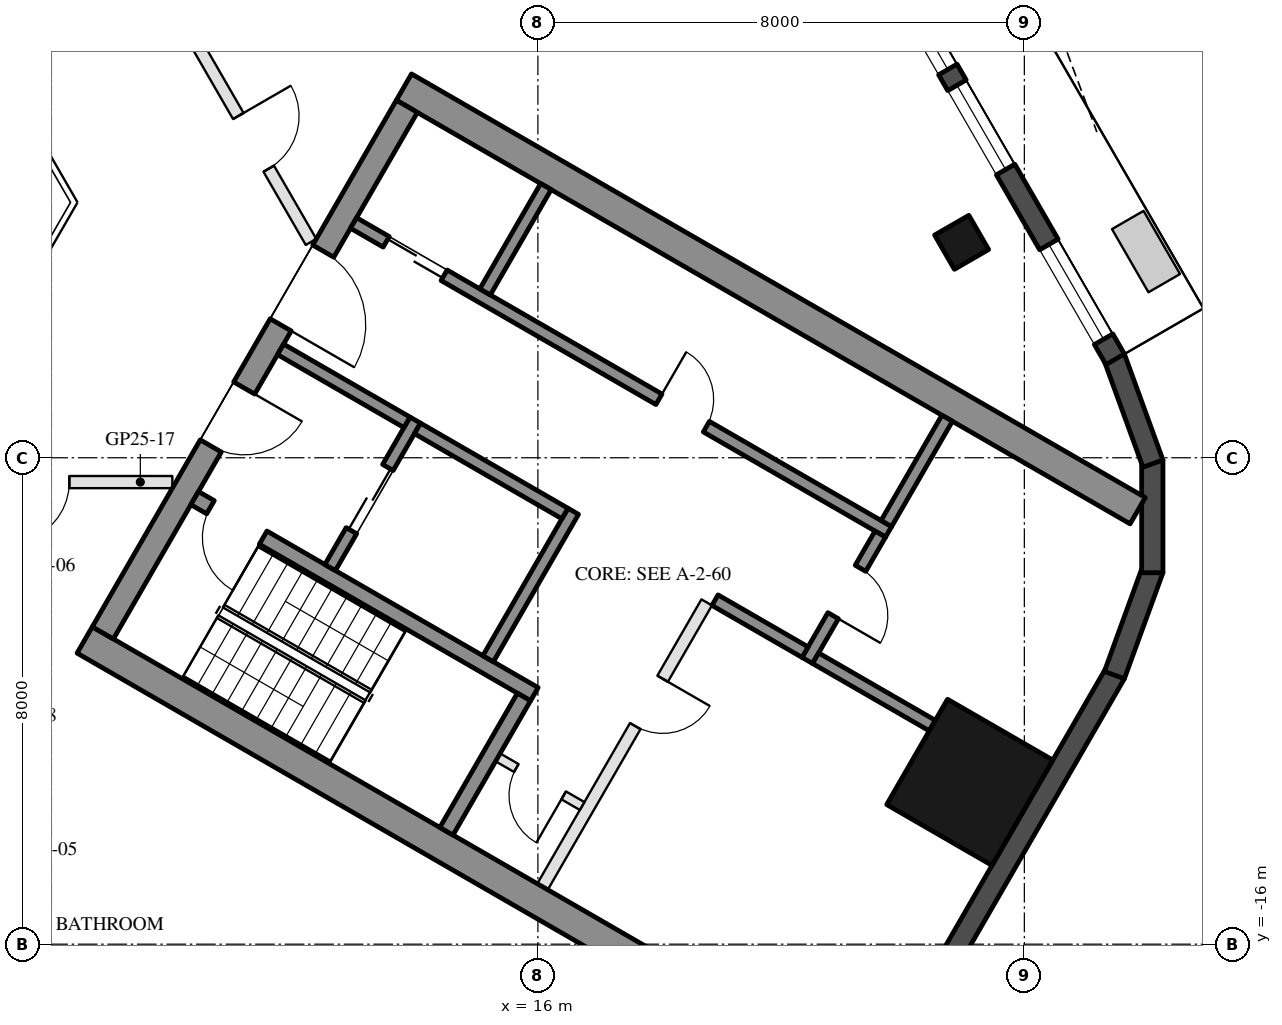
"""IFC4 building model, lengths in metres.
Left out: names, types, materials, properties, quantities, classifications, styles, units other than length and angle.
Written with IfcOpenShell. Run it as: python <this file> out.ifc"""

import sys

from ifc_helpers import new_model, si_unit, direction, frame, frame_2d, origin, origin_2d, place, context, subcontext, project, spatial, rectangle, hollow_rectangle, extrude, boolean, halfspace, element, fill, save


model = new_model("IFC4")
c1 = context("Model", 3, precision=1e-05, world=origin(), true_north=direction((0.0, 1.0)))
c2 = subcontext(c1, "Body", "Model", "MODEL_VIEW")
j1 = project(units=[si_unit("LENGTHUNIT", "METRE"), si_unit("PLANEANGLEUNIT", "RADIAN")], contexts=[c1])
p1 = place(None, origin())
s1 = spatial("IfcSite", under=j1, at=p1, CompositionType="ELEMENT")
p2 = place(p1, origin())
s2 = spatial("IfcBuilding", under=s1, at=p2, CompositionType="ELEMENT")
p3 = place(p2, frame((0.0, 0.0, 257.8)))
s3 = spatial("IfcBuildingStorey", under=s2, at=p3, CompositionType="ELEMENT", Elevation=257.8)
p4 = place(p3, frame((22.968, -4.457, 0.0), z_axis=(0.0, 0.0, 1.0), x_axis=(-0.5, 0.866025403784, 0.0)))
e1 = element("IfcColumn", 1, at=p4, inside=s3, PredefinedType="COLUMN", context=c2, shape_type="SweptSolid", body=[
    boolean("DIFFERENCE", extrude(hollow_rectangle(XDim=0.65, YDim=0.65, WallThickness=0.03, at=origin_2d()), origin(), (0.0, 0.0, 1.0), 3.7), halfspace(frame((0.0, 0.0, 0.047), z_axis=(0.0, 0.0, 1.0), x_axis=(1.0, 0.0, 0.0)), True)),
])
p5 = place(p3, frame((23.102, -13.338, 0.0), z_axis=(0.0, 0.0, 1.0), x_axis=(0.5, 0.866025403784, 0.0)))
e2 = element("IfcColumn", 2, at=p5, inside=s3, PredefinedType="COLUMN", context=c2, shape_type="SweptSolid", body=[
    boolean("DIFFERENCE", extrude(hollow_rectangle(XDim=2.0, YDim=2.0, WallThickness=0.05, at=origin_2d()), origin(), (0.0, 0.0, 1.0), 3.7), halfspace(frame((0.0, 0.0, 0.112), z_axis=(0.0, 0.0, 1.0), x_axis=(1.0, 0.0, 0.0)), True)),
])
p6 = place(p3, frame((22.746, -16.305, 0.0), z_axis=(0.0, 0.0, 1.0), x_axis=(0.500028854569, 0.86600874395, 0.0)))
e3 = element("IfcWall", 3, at=p6, inside=s3, PredefinedType="SOLIDWALL", context=c2, shape_type="SweptSolid", body=[
    extrude(rectangle(XDim=5.495, YDim=0.35, at=frame_2d((2.748, 0.0))), origin(), (0.0, 0.0, 1.0), 3.55),
])
p7 = place(p3, frame((25.481, -11.574, 0.0), z_axis=(0.0, 0.0, 1.0), x_axis=(0.341890986265, 0.93973962006, 0.0)))
e4 = element("IfcWall", 4, at=p7, inside=s3, PredefinedType="SOLIDWALL", context=c2, shape_type="SweptSolid", body=[
    extrude(rectangle(XDim=1.855, YDim=0.35, at=frame_2d((0.928, 0.0))), origin(), (0.0, 0.0, 1.0), 3.55),
])
for number, where, z_axis, x_axis in (
    (5, (26.104, -9.891, 0.0), (0.0, 0.0, 1.0), (0.0, 1.0, 0.0)),
    (6, (26.115, -8.096, 0.0), (0.0, 0.0, 1.0), (-0.342, 0.94, 0.0)),
):
    element("IfcWall", number, at=place(p3, frame(where, z_axis=z_axis, x_axis=x_axis)), inside=s3, PredefinedType="SOLIDWALL", context=c2, shape_type="SweptSolid", body=[
        extrude(rectangle(XDim=1.855, YDim=0.35, at=frame_2d((0.927, 0.0))), origin(), (0.0, 0.0, 1.0), 3.55),
    ])
p8 = place(p3, frame((25.494, -6.38, 0.0), z_axis=(0.0, 0.0, 1.0), x_axis=(-0.499999932627, 0.866025442683, 0.0)))
e7 = element("IfcWall", 7, at=p8, inside=s3, PredefinedType="SOLIDWALL", context=c2, shape_type="SweptSolid", body=[
    extrude(rectangle(XDim=11.5, YDim=0.35, at=frame_2d((5.75, 0.0))), origin(), (0.0, 0.0, 1.0), 3.55),
])
p9 = place(p8, frame((0.38, 0.0, 0.3)))
e8 = element("IfcOpeningElement", 8, at=p9, cuts=e7, PredefinedType="OPENING", context=c2, shape_type="SweptSolid", body=[
    extrude(rectangle(XDim=1.8, YDim=2.65, at=frame_2d((0.9, 1.325))), frame((0.0, 0.185, 0.0), z_axis=(0.0, -1.0, 0.0), x_axis=(1.0, 0.0, 0.0)), (0.0, 0.0, 1.0), 0.37),
])
p10 = place(p8, frame((7.525, 0.0, 0.0)))
e9 = element("IfcOpeningElement", 9, at=p10, cuts=e7, PredefinedType="OPENING", context=c2, shape_type="SweptSolid", body=[
    extrude(rectangle(XDim=2.4, YDim=2.4, at=frame_2d((1.2, 1.2))), frame((0.0, 0.185, 0.0), z_axis=(0.0, -1.0, 0.0), x_axis=(1.0, 0.0, 0.0)), (0.0, 0.0, 1.0), 0.37),
])
p11 = place(p8, frame((3.604, 0.0, 0.3)))
e10 = element("IfcOpeningElement", 10, at=p11, cuts=e7, PredefinedType="OPENING", context=c2, shape_type="SweptSolid", body=[
    extrude(rectangle(XDim=1.6, YDim=2.65, at=frame_2d((0.8, 1.325))), frame((0.0, 0.185, 0.0), z_axis=(0.0, -1.0, 0.0), x_axis=(1.0, 0.0, 0.0)), (0.0, 0.0, 1.0), 0.37),
])
p12 = place(p8, frame((5.503, 0.0, 0.3)))
e11 = element("IfcOpeningElement", 11, at=p12, cuts=e7, PredefinedType="OPENING", context=c2, shape_type="SweptSolid", body=[
    extrude(rectangle(XDim=1.6, YDim=2.65, at=frame_2d((0.8, 1.325))), frame((0.0, 0.185, 0.0), z_axis=(0.0, -1.0, 0.0), x_axis=(1.0, 0.0, 0.0)), (0.0, 0.0, 1.0), 0.37),
])
for number, where, z_axis, x_axis in (
    (12, (8.547, -10.997, 0.0), (0.0, 0.0, 1.0), (0.866, -0.5, 0.0)),
    (13, (13.797, -1.903, 0.0), (0.0, 0.0, 1.0), (0.866, -0.5, 0.0)),
):
    element("IfcWall", number, at=place(p3, frame(where, z_axis=z_axis, x_axis=x_axis)), inside=s3, PredefinedType="SHEAR", context=c2, shape_type="SweptSolid", body=[
        extrude(rectangle(XDim=13.934, YDim=0.5, at=frame_2d((6.967, 0.0))), origin(), (0.0, 0.0, 1.0), 3.5),
    ])
p13 = place(p3, frame((8.845, -10.88, 0.0), z_axis=(0.0, 0.0, 1.0), x_axis=(0.500004234368, 0.866022959057, 0.0)))
e14 = element("IfcWall", 14, at=p13, inside=s3, PredefinedType="SHEAR", context=c2, shape_type="SweptSolid", body=[
    extrude(rectangle(XDim=10.0, YDim=0.4, at=frame_2d((5.0, 0.0))), origin(), (0.0, 0.0, 1.0), 3.5),
])
p14 = place(p13, frame((3.55, 0.0, 0.0)))
e15 = element("IfcOpeningElement", 15, at=p14, cuts=e14, PredefinedType="OPENING", context=c2, shape_type="SweptSolid", body=[
    extrude(rectangle(XDim=1.1, YDim=2.1, at=frame_2d((0.55, 1.05))), frame((0.0, 0.21, 0.0), z_axis=(0.0, -1.0, 0.0), x_axis=(1.0, 0.0, 0.0)), (0.0, 0.0, 1.0), 0.42),
])
p15 = place(p13, frame((5.85, 0.0, 0.0)))
e16 = element("IfcOpeningElement", 16, at=p15, cuts=e14, PredefinedType="OPENING", context=c2, shape_type="SweptSolid", body=[
    extrude(rectangle(XDim=1.4, YDim=2.1, at=frame_2d((0.7, 1.05))), frame((0.0, 0.21, 0.0), z_axis=(0.0, -1.0, 0.0), x_axis=(1.0, 0.0, 0.0)), (0.0, 0.0, 1.0), 0.42),
])
p16 = place(p3, frame((10.356, -8.664, 0.0), z_axis=(0.0, 0.0, 1.0), x_axis=(0.866028629588, -0.499994412703, 0.0)))
e17 = element("IfcWall", 17, at=p16, inside=s3, PredefinedType="SHEAR", context=c2, shape_type="SweptSolid", body=[
    extrude(rectangle(XDim=6.45, YDim=0.25, at=frame_2d((3.225, 0.0))), origin(), (0.0, 0.0, 1.0), 3.5),
])
p17 = place(p16, frame((0.3, 0.0, 0.0)))
e18 = element("IfcOpeningElement", 18, at=p17, cuts=e17, PredefinedType="OPENING", context=c2, shape_type="SweptSolid", body=[
    extrude(rectangle(XDim=1.0, YDim=2.1, at=frame_2d((0.5, 1.05))), frame((0.0, 0.135, 0.0), z_axis=(0.0, -1.0, 0.0), x_axis=(1.0, 0.0, 0.0)), (0.0, 0.0, 1.0), 0.27),
])
p18 = place(p3, frame((14.496, -14.143, 0.0), z_axis=(0.0, 0.0, 1.0), x_axis=(0.500062241894, 0.865989465428, 0.0)))
e19 = element("IfcWall", 19, at=p18, inside=s3, PredefinedType="SHEAR", context=c2, shape_type="SweptSolid", body=[
    extrude(rectangle(XDim=2.55, YDim=0.25, at=frame_2d((1.275, 0.0))), origin(), (0.0, 0.0, 1.0), 3.5),
])
p19 = place(p3, frame((15.181, -11.305, 0.0), z_axis=(0.0, 0.0, 1.0), x_axis=(0.49994636267, 0.866056369097, 0.0)))
e20 = element("IfcWall", 20, at=p19, inside=s3, PredefinedType="SHEAR", context=c2, shape_type="SweptSolid", body=[
    extrude(rectangle(XDim=2.8, YDim=0.2, at=frame_2d((1.4, 0.0))), origin(), (0.0, 0.0, 1.0), 3.5),
])
p20 = place(p3, frame((12.583, -9.805, 0.0), z_axis=(0.0, 0.0, 1.0), x_axis=(0.49994636267, 0.866056369097, 0.0)))
e21 = element("IfcWall", 21, at=p20, inside=s3, PredefinedType="SHEAR", context=c2, shape_type="SweptSolid", body=[
    extrude(rectangle(XDim=2.8, YDim=0.2, at=frame_2d((1.4, 0.0))), origin(), (0.0, 0.0, 1.0), 3.5),
])
p21 = place(p20, frame((0.7, 0.0, 0.0)))
e22 = element("IfcOpeningElement", 22, at=p21, cuts=e21, PredefinedType="OPENING", context=c2, shape_type="SweptSolid", body=[
    extrude(rectangle(XDim=1.2, YDim=2.1, at=frame_2d((0.6, 1.05))), frame((0.0, 0.11, 0.0), z_axis=(0.0, -1.0, 0.0), x_axis=(1.0, 0.0, 0.0)), (0.0, 0.0, 1.0), 0.22),
])
p22 = place(p3, frame((11.768, -6.217, 0.0), z_axis=(0.0, 0.0, 1.0), x_axis=(0.866050077142, -0.499957262057, 0.0)))
e23 = element("IfcWall", 23, at=p22, inside=s3, PredefinedType="SHEAR", context=c2, shape_type="SweptSolid", body=[
    extrude(rectangle(XDim=2.4, YDim=0.2, at=frame_2d((1.2, 0.0))), origin(), (0.0, 0.0, 1.0), 3.5),
])
p23 = place(p3, frame((14.02, -7.517, 0.0), z_axis=(0.0, 0.0, 1.0), x_axis=(0.866034573852, -0.49998411664, 0.0)))
e24 = element("IfcWall", 24, at=p23, inside=s3, PredefinedType="SHEAR", context=c2, shape_type="SweptSolid", body=[
    extrude(rectangle(XDim=2.8, YDim=0.2, at=frame_2d((1.4, 0.0))), origin(), (0.0, 0.0, 1.0), 3.5),
])
p24 = place(p3, frame((12.968, -4.138, 0.0), z_axis=(0.0, 0.0, 1.0), x_axis=(0.866028328073, -0.49999493495, 0.0)))
e25 = element("IfcWall", 25, at=p24, inside=s3, PredefinedType="SHEAR", context=c2, shape_type="SweptSolid", body=[
    extrude(rectangle(XDim=10.16, YDim=0.2, at=frame_2d((5.08, 0.0))), origin(), (0.0, 0.0, 1.0), 3.5),
])
p25 = place(p24, frame((0.62, 0.0, 0.0)))
e26 = element("IfcOpeningElement", 26, at=p25, cuts=e25, PredefinedType="OPENING", context=c2, shape_type="SweptSolid", body=[
    extrude(rectangle(XDim=1.1, YDim=2.1, at=frame_2d((0.55, 1.05))), frame((0.0, 0.11, 0.0), z_axis=(0.0, -1.0, 0.0), x_axis=(1.0, 0.0, 0.0)), (0.0, 0.0, 1.0), 0.22),
])
p26 = place(p24, frame((5.8, 0.0, 0.0)))
e27 = element("IfcOpeningElement", 27, at=p26, cuts=e25, PredefinedType="OPENING", context=c2, shape_type="SweptSolid", body=[
    extrude(rectangle(XDim=0.9, YDim=2.1, at=frame_2d((0.45, 1.05))), frame((0.0, 0.11, 0.0), z_axis=(0.0, -1.0, 0.0), x_axis=(1.0, 0.0, 0.0)), (0.0, 0.0, 1.0), 0.22),
])
p27 = place(p3, frame((20.43, -11.333, 0.0), z_axis=(0.0, 0.0, 1.0), x_axis=(0.500001309137, 0.866024647952, 0.0)))
e28 = element("IfcWall", 28, at=p27, inside=s3, PredefinedType="SHEAR", context=c2, shape_type="SweptSolid", body=[
    extrude(rectangle(XDim=2.4, YDim=0.2, at=frame_2d((1.2, 0.0))), origin(), (0.0, 0.0, 1.0), 3.5),
])
p28 = place(p27, frame((0.85, 0.0, 0.0)))
e29 = element("IfcOpeningElement", 29, at=p28, cuts=e28, PredefinedType="OPENING", context=c2, shape_type="SweptSolid", body=[
    extrude(rectangle(XDim=0.9, YDim=2.1, at=frame_2d((0.45, 1.05))), frame((0.0, 0.11, 0.0), z_axis=(0.0, -1.0, 0.0), x_axis=(1.0, 0.0, 0.0)), (0.0, 0.0, 1.0), 0.22),
])
p29 = place(p3, frame((18.913, -10.342, 0.0), z_axis=(0.0, 0.0, 1.0), x_axis=(0.866038183914, -0.499977863513, 0.0)))
e30 = element("IfcWall", 30, at=p29, inside=s3, PredefinedType="SHEAR", context=c2, shape_type="SweptSolid", body=[
    extrude(rectangle(XDim=1.71, YDim=0.2, at=frame_2d((0.855, 0.0))), origin(), (0.0, 0.0, 1.0), 3.5),
])
for number, where, z_axis, x_axis in (
    (31, (15.131, -5.272, 0.0), (0.0, 0.0, 1.0), (0.5, 0.866, 0.0)),
    (32, (21.73, -9.082, 0.0), (0.0, 0.0, 1.0), (0.5, 0.866, 0.0)),
):
    element("IfcWall", number, at=place(p3, frame(where, z_axis=z_axis, x_axis=x_axis)), inside=s3, PredefinedType="SHEAR", context=c2, shape_type="SweptSolid", body=[
        extrude(rectangle(XDim=2.0, YDim=0.2, at=frame_2d((1.0, 0.0))), origin(), (0.0, 0.0, 1.0), 3.5),
    ])
p30 = place(p3, frame((20.567, -11.297, 0.0), z_axis=(0.0, 0.0, 1.0), x_axis=(0.866079196458, -0.49990681678, 0.0)))
e33 = element("IfcWall", 33, at=p30, inside=s3, PredefinedType="SHEAR", context=c2, shape_type="SweptSolid", body=[
    extrude(rectangle(XDim=2.216, YDim=0.2, at=frame_2d((1.108, 0.0))), origin(), (0.0, 0.0, 1.0), 3.5),
])
p31 = place(p3, frame((16.076, -15.055, 0.0), z_axis=(0.0, 0.0, 1.0), x_axis=(0.499995103361, 0.866028230842, 0.0)))
e34 = element("IfcWall", 34, at=p31, inside=s3, PredefinedType="PARTITIONING", context=c2, shape_type="SweptSolid", body=[
    extrude(rectangle(XDim=5.4, YDim=0.2, at=frame_2d((2.7, 0.0))), origin(), (0.0, 0.0, 1.0), 3.5),
])
p32 = place(p31, frame((3.05, 0.0, 0.0)))
e35 = element("IfcOpeningElement", 35, at=p32, cuts=e34, PredefinedType="OPENING", context=c2, shape_type="SweptSolid", body=[
    extrude(rectangle(XDim=0.9, YDim=2.1, at=frame_2d((0.45, 1.05))), frame((0.0, 0.11, 0.0), z_axis=(0.0, -1.0, 0.0), x_axis=(1.0, 0.0, 0.0)), (0.0, 0.0, 1.0), 0.22),
])
p33 = place(p3, frame((15.342, -12.928, 0.0), z_axis=(0.0, 0.0, 1.0), x_axis=(0.865989903783, -0.500061482766, 0.0)))
e36 = element("IfcWall", 36, at=p33, inside=s3, PredefinedType="PARTITIONING", context=c2, shape_type="SweptSolid", body=[
    extrude(rectangle(XDim=1.6, YDim=0.15, at=frame_2d((0.8, 0.0))), origin(), (0.0, 0.0, 1.0), 3.5),
])
p34 = place(p33, frame((0.35, 0.0, 0.0)))
e37 = element("IfcOpeningElement", 37, at=p34, cuts=e36, PredefinedType="OPENING", context=c2, shape_type="SweptSolid", body=[
    extrude(rectangle(XDim=0.9, YDim=2.1, at=frame_2d((0.45, 1.05))), frame((0.0, 0.085, 0.0), z_axis=(0.0, -1.0, 0.0), x_axis=(1.0, 0.0, 0.0)), (0.0, 0.0, 1.0), 0.17),
])
p35 = place(p3, frame((9.988, -8.4, 0.0), z_axis=(0.0, 0.0, 1.0), x_axis=(-1.0, 0.0, 0.0)))
e38 = element("IfcWall", 38, at=p35, inside=s3, PredefinedType="PARTITIONING", context=c2, shape_type="SweptSolid", body=[
    extrude(rectangle(XDim=4.388, YDim=0.2, at=frame_2d((2.194, 0.0))), origin(), (0.0, 0.0, 1.0), 3.0),
])
p36 = place(p35, frame((1.694, 0.0, 0.0)))
e39 = element("IfcOpeningElement", 39, at=p36, cuts=e38, PredefinedType="OPENING", context=c2, shape_type="SweptSolid", body=[
    extrude(rectangle(XDim=1.0, YDim=2.1, at=frame_2d((0.5, 1.05))), frame((0.0, 0.11, 0.0), z_axis=(0.0, -1.0, 0.0), x_axis=(1.0, 0.0, 0.0)), (0.0, 0.0, 1.0), 0.22),
])
p37 = place(p3, frame((10.378, -1.175, 0.0), z_axis=(0.0, 0.0, 1.0), x_axis=(0.50004096614, -0.86600175068, 0.0)))
e40 = element("IfcWall", 40, at=p37, inside=s3, PredefinedType="PARTITIONING", context=c2, shape_type="SweptSolid", body=[
    extrude(rectangle(XDim=3.782, YDim=0.2, at=frame_2d((1.891, 0.0))), origin(), (0.0, 0.0, 1.0), 3.0),
])
p38 = place(p37, frame((1.391, 0.0, 0.0)))
e41 = element("IfcOpeningElement", 41, at=p38, cuts=e40, PredefinedType="OPENING", context=c2, shape_type="SweptSolid", body=[
    extrude(rectangle(XDim=1.0, YDim=2.1, at=frame_2d((0.5, 1.05))), frame((0.0, 0.11, 0.0), z_axis=(0.0, -1.0, 0.0), x_axis=(1.0, 0.0, 0.0)), (0.0, 0.0, 1.0), 0.22),
])
p39 = place(p9, origin())
e42 = element("IfcWindow", 42, at=p39, inside=s3, PartitioningType="SINGLE_PANEL", PredefinedType="WINDOW", context=c2, shape_type="SweptSolid", body=[
    extrude(rectangle(XDim=1.8, YDim=2.65, at=frame_2d((0.9, 1.325))), frame((0.0, 0.03, 0.0), z_axis=(0.0, -1.0, 0.0), x_axis=(1.0, 0.0, 0.0)), (0.0, 0.0, 1.0), 0.06),
])
fill(e8, e42)
p40 = place(p11, origin())
e43 = element("IfcWindow", 43, at=p40, inside=s3, PartitioningType="SINGLE_PANEL", PredefinedType="WINDOW", context=c2, shape_type="SweptSolid", body=[
    extrude(rectangle(XDim=1.6, YDim=2.65, at=frame_2d((0.8, 1.325))), frame((0.0, 0.03, 0.0), z_axis=(0.0, -1.0, 0.0), x_axis=(1.0, 0.0, 0.0)), (0.0, 0.0, 1.0), 0.06),
])
fill(e10, e43)
p41 = place(p12, origin())
e44 = element("IfcWindow", 44, at=p41, inside=s3, PartitioningType="SINGLE_PANEL", PredefinedType="WINDOW", context=c2, shape_type="SweptSolid", body=[
    extrude(rectangle(XDim=1.6, YDim=2.65, at=frame_2d((0.8, 1.325))), frame((0.0, 0.03, 0.0), z_axis=(0.0, -1.0, 0.0), x_axis=(1.0, 0.0, 0.0)), (0.0, 0.0, 1.0), 0.06),
])
fill(e11, e44)
p42 = place(p21, origin())
e45 = element("IfcDoor", 45, at=p42, inside=s3, OperationType="DOUBLE_DOOR_SLIDING", PredefinedType="DOOR", context=c2, shape_type="SweptSolid", body=[
    extrude(rectangle(XDim=1.2, YDim=2.1, at=frame_2d((0.6, 1.05))), frame((0.0, 0.025, 0.0), z_axis=(0.0, -1.0, 0.0), x_axis=(1.0, 0.0, 0.0)), (0.0, 0.0, 1.0), 0.05),
])
fill(e22, e45)
p43 = place(p34, frame((0.9, 0.0, 0.0), z_axis=(0.0, 0.0, 1.0), x_axis=(-1.0, 0.0, 0.0)))
e46 = element("IfcDoor", 46, at=p43, inside=s3, OperationType="SINGLE_SWING_LEFT", PredefinedType="DOOR", context=c2, shape_type="SweptSolid", body=[
    extrude(rectangle(XDim=0.9, YDim=2.1, at=frame_2d((0.45, 1.05))), frame((0.0, 0.025, 0.0), z_axis=(0.0, -1.0, 0.0), x_axis=(1.0, 0.0, 0.0)), (0.0, 0.0, 1.0), 0.05),
])
fill(e37, e46)
p44 = place(p25, origin())
e47 = element("IfcDoor", 47, at=p44, inside=s3, OperationType="DOUBLE_DOOR_SLIDING", PredefinedType="DOOR", context=c2, shape_type="SweptSolid", body=[
    extrude(rectangle(XDim=1.1, YDim=2.1, at=frame_2d((0.55, 1.05))), frame((0.0, 0.025, 0.0), z_axis=(0.0, -1.0, 0.0), x_axis=(1.0, 0.0, 0.0)), (0.0, 0.0, 1.0), 0.05),
])
fill(e26, e47)
p45 = place(p26, origin())
e48 = element("IfcDoor", 48, at=p45, inside=s3, OperationType="SINGLE_SWING_LEFT", PredefinedType="DOOR", context=c2, shape_type="SweptSolid", body=[
    extrude(rectangle(XDim=0.9, YDim=2.1, at=frame_2d((0.45, 1.05))), frame((0.0, 0.025, 0.0), z_axis=(0.0, -1.0, 0.0), x_axis=(1.0, 0.0, 0.0)), (0.0, 0.0, 1.0), 0.05),
])
fill(e27, e48)
p46 = place(p28, frame((0.9, 0.0, 0.0), z_axis=(0.0, 0.0, 1.0), x_axis=(-1.0, 0.0, 0.0)))
e49 = element("IfcDoor", 49, at=p46, inside=s3, OperationType="SINGLE_SWING_RIGHT", PredefinedType="DOOR", context=c2, shape_type="SweptSolid", body=[
    extrude(rectangle(XDim=0.9, YDim=2.1, at=frame_2d((0.45, 1.05))), frame((0.0, 0.025, 0.0), z_axis=(0.0, -1.0, 0.0), x_axis=(1.0, 0.0, 0.0)), (0.0, 0.0, 1.0), 0.05),
])
fill(e29, e49)
p47 = place(p32, frame((0.9, 0.0, 0.0), z_axis=(0.0, 0.0, 1.0), x_axis=(-1.0, 0.0, 0.0)))
e50 = element("IfcDoor", 50, at=p47, inside=s3, OperationType="SINGLE_SWING_LEFT", PredefinedType="DOOR", context=c2, shape_type="SweptSolid", body=[
    extrude(rectangle(XDim=0.9, YDim=2.1, at=frame_2d((0.45, 1.05))), frame((0.0, 0.025, 0.0), z_axis=(0.0, -1.0, 0.0), x_axis=(1.0, 0.0, 0.0)), (0.0, 0.0, 1.0), 0.05),
])
fill(e35, e50)
p48 = place(p14, frame((1.1, 0.0, 0.0), z_axis=(0.0, 0.0, 1.0), x_axis=(-1.0, 0.0, 0.0)))
e51 = element("IfcDoor", 51, at=p48, inside=s3, OperationType="SINGLE_SWING_LEFT", PredefinedType="DOOR", context=c2, shape_type="SweptSolid", body=[
    extrude(rectangle(XDim=1.1, YDim=2.1, at=frame_2d((0.55, 1.05))), frame((0.0, 0.025, 0.0), z_axis=(0.0, -1.0, 0.0), x_axis=(1.0, 0.0, 0.0)), (0.0, 0.0, 1.0), 0.05),
])
fill(e15, e51)
p49 = place(p15, frame((1.4, 0.0, 0.0), z_axis=(0.0, 0.0, 1.0), x_axis=(-1.0, 0.0, 0.0)))
e52 = element("IfcDoor", 52, at=p49, inside=s3, OperationType="DOUBLE_DOOR_SINGLE_SWING", PredefinedType="DOOR", context=c2, shape_type="SweptSolid", body=[
    extrude(rectangle(XDim=1.4, YDim=2.1, at=frame_2d((0.7, 1.05))), frame((0.0, 0.025, 0.0), z_axis=(0.0, -1.0, 0.0), x_axis=(1.0, 0.0, 0.0)), (0.0, 0.0, 1.0), 0.05),
])
fill(e16, e52)
p50 = place(p17, frame((1.0, 0.0, 0.0), z_axis=(0.0, 0.0, 1.0), x_axis=(-1.0, 0.0, 0.0)))
e53 = element("IfcDoor", 53, at=p50, inside=s3, OperationType="SINGLE_SWING_LEFT", PredefinedType="DOOR", context=c2, shape_type="SweptSolid", body=[
    extrude(rectangle(XDim=1.0, YDim=2.1, at=frame_2d((0.5, 1.05))), frame((0.0, 0.025, 0.0), z_axis=(0.0, -1.0, 0.0), x_axis=(1.0, 0.0, 0.0)), (0.0, 0.0, 1.0), 0.05),
])
fill(e18, e53)
p51 = place(p36, origin())
e54 = element("IfcDoor", 54, at=p51, inside=s3, OperationType="SINGLE_SWING_RIGHT", PredefinedType="DOOR", context=c2, shape_type="SweptSolid", body=[
    extrude(rectangle(XDim=1.0, YDim=2.1, at=frame_2d((0.5, 1.05))), frame((0.0, 0.025, 0.0), z_axis=(0.0, -1.0, 0.0), x_axis=(1.0, 0.0, 0.0)), (0.0, 0.0, 1.0), 0.05),
])
fill(e39, e54)
p52 = place(p38, origin())
e55 = element("IfcDoor", 55, at=p52, inside=s3, OperationType="SINGLE_SWING_LEFT", PredefinedType="DOOR", context=c2, shape_type="SweptSolid", body=[
    extrude(rectangle(XDim=1.0, YDim=2.1, at=frame_2d((0.5, 1.05))), frame((0.0, 0.025, 0.0), z_axis=(0.0, -1.0, 0.0), x_axis=(1.0, 0.0, 0.0)), (0.0, 0.0, 1.0), 0.05),
])
fill(e41, e55)
save(model, sys.argv[1])
